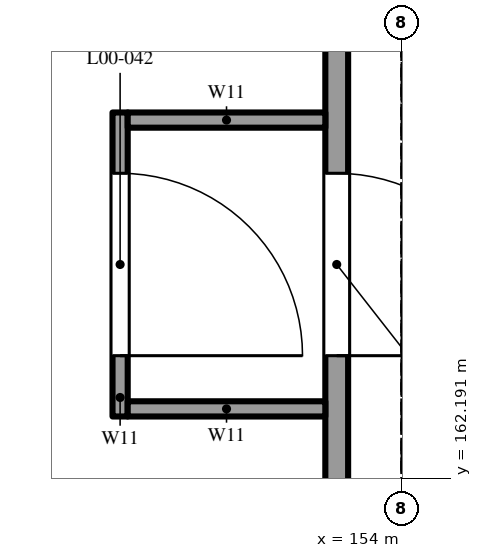
"""IFC4 building model, lengths in metres.
Left out: names, types, materials, properties, quantities, classifications, styles, units other than length and angle.
Written with IfcOpenShell. Run it as: python <this file> out.ifc"""

import sys

from ifc_helpers import new_model, si_unit, direction, frame, frame_2d, origin, place, context, subcontext, project, spatial, rectangle, extrude, element, fill, save


model = new_model("IFC4")
c1 = context("Model", 3, precision=1e-05, world=origin(), true_north=direction((0.0, 1.0)))
c2 = subcontext(c1, "Body", "Model", "MODEL_VIEW")
j1 = project(units=[si_unit("LENGTHUNIT", "METRE"), si_unit("PLANEANGLEUNIT", "RADIAN")], contexts=[c1])
p1 = place(None, origin())
s1 = spatial("IfcSite", under=j1, at=p1, CompositionType="ELEMENT")
p2 = place(p1, origin())
s2 = spatial("IfcBuilding", under=s1, at=p2, CompositionType="ELEMENT")
p3 = place(p2, origin())
s3 = spatial("IfcBuildingStorey", under=s2, at=p3, CompositionType="ELEMENT", Elevation=0.0)
p4 = place(p3, frame((153.15, 132.15, 0.0), z_axis=(0.0, 0.0, 1.0), x_axis=(0.0, 1.0, 0.0)))
e1 = element("IfcWall", 1, at=p4, inside=s3, PredefinedType="SOLIDWALL", context=c2, shape_type="SweptSolid", body=[
    extrude(rectangle(XDim=83.7, YDim=0.3, at=frame_2d((41.85, 0.0))), origin(), (0.0, 0.0, 1.0), 7.2),
])
p5 = place(p4, frame((31.65, 0.0, 0.0)))
e2 = element("IfcOpeningElement", 2, at=p5, cuts=e1, PredefinedType="OPENING", context=c2, shape_type="SweptSolid", body=[
    extrude(rectangle(XDim=2.4, YDim=2.4, at=frame_2d((1.2, 1.2))), frame((0.0, 0.16, 0.0), z_axis=(0.0, -1.0, 0.0), x_axis=(1.0, 0.0, 0.0)), (0.0, 0.0, 1.0), 0.32),
])
p6 = place(p4, frame((49.65, 0.0, 0.0)))
e3 = element("IfcOpeningElement", 3, at=p6, cuts=e1, PredefinedType="OPENING", context=c2, shape_type="SweptSolid", body=[
    extrude(rectangle(XDim=2.4, YDim=2.4, at=frame_2d((1.2, 1.2))), frame((0.0, 0.16, 0.0), z_axis=(0.0, -1.0, 0.0), x_axis=(1.0, 0.0, 0.0)), (0.0, 0.0, 1.0), 0.32),
])
p7 = place(p3, frame((150.3, 163.0, 0.0), z_axis=(0.0, 0.0, 1.0), x_axis=(0.0, 1.0, 0.0)))
e4 = element("IfcWall", 4, at=p7, inside=s3, PredefinedType="SOLIDWALL", context=c2, shape_type="SweptSolid", body=[
    extrude(rectangle(XDim=4.0, YDim=0.2, at=frame_2d((2.0, 0.0))), origin(), (0.0, 0.0, 1.0), 3.4),
])
p8 = place(p7, frame((0.8, 0.0, 0.0)))
e5 = element("IfcOpeningElement", 5, at=p8, cuts=e4, PredefinedType="OPENING", context=c2, shape_type="SweptSolid", body=[
    extrude(rectangle(XDim=2.4, YDim=2.4, at=frame_2d((1.2, 1.2))), frame((0.0, 0.11, 0.0), z_axis=(0.0, -1.0, 0.0), x_axis=(1.0, 0.0, 0.0)), (0.0, 0.0, 1.0), 0.22),
])
for number, where, z_axis, x_axis in (
    (6, (150.4, 163.1, 0.0), (0.0, 0.0, 1.0), (1.0, 0.0, 0.0)),
    (7, (150.4, 166.9, 0.0), (0.0, 0.0, 1.0), (1.0, 0.0, 0.0)),
):
    element("IfcWall", number, at=place(p3, frame(where, z_axis=z_axis, x_axis=x_axis)), inside=s3, PredefinedType="SOLIDWALL", context=c2, shape_type="SweptSolid", body=[
        extrude(rectangle(XDim=2.6, YDim=0.2, at=frame_2d((1.3, 0.0))), origin(), (0.0, 0.0, 1.0), 3.4),
    ])
p9 = place(p5, frame((2.4, 0.0, 0.0), z_axis=(0.0, 0.0, 1.0), x_axis=(-1.0, 0.0, 0.0)))
e8 = element("IfcDoor", 8, at=p9, inside=s3, OperationType="DOUBLE_DOOR_SINGLE_SWING", PredefinedType="DOOR", context=c2, shape_type="SweptSolid", body=[
    extrude(rectangle(XDim=2.4, YDim=2.4, at=frame_2d((1.2, 1.2))), frame((0.0, 0.025, 0.0), z_axis=(0.0, -1.0, 0.0), x_axis=(1.0, 0.0, 0.0)), (0.0, 0.0, 1.0), 0.05),
])
fill(e2, e8)
p10 = place(p8, frame((2.4, 0.0, 0.0), z_axis=(0.0, 0.0, 1.0), x_axis=(-1.0, 0.0, 0.0)))
e9 = element("IfcDoor", 9, at=p10, inside=s3, OperationType="DOUBLE_DOOR_SINGLE_SWING", PredefinedType="DOOR", context=c2, shape_type="SweptSolid", body=[
    extrude(rectangle(XDim=2.4, YDim=2.4, at=frame_2d((1.2, 1.2))), frame((0.0, 0.025, 0.0), z_axis=(0.0, -1.0, 0.0), x_axis=(1.0, 0.0, 0.0)), (0.0, 0.0, 1.0), 0.05),
])
fill(e5, e9)
save(model, sys.argv[1])
